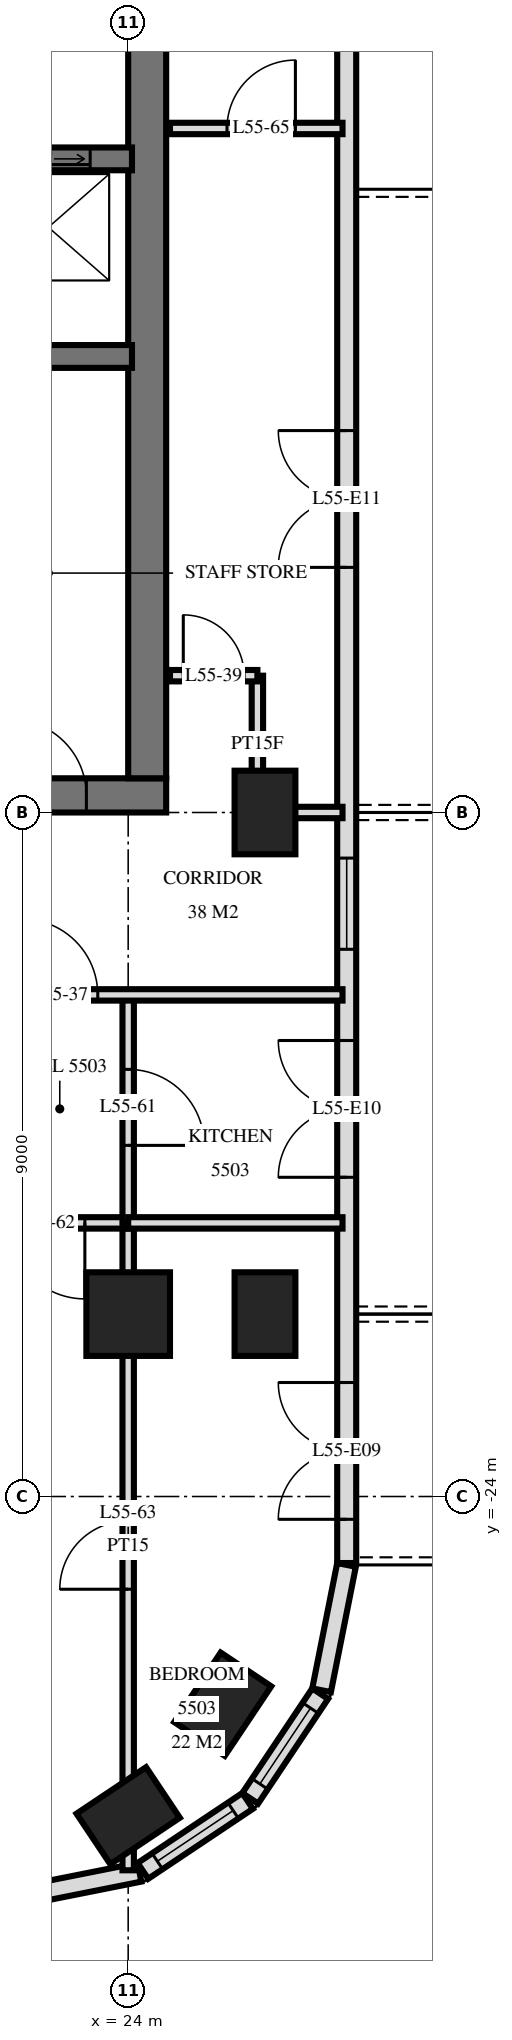
"""IFC4 building model, lengths in metres.
Left out: names, types, materials, properties, quantities, classifications, styles, units other than length and angle.
Written with IfcOpenShell. Run it as: python <this file> out.ifc"""

import sys

from ifc_helpers import new_model, si_unit, direction, frame, frame_2d, origin, origin_2d, place, context, subcontext, project, spatial, rectangle, extrude, element, fill, save


model = new_model("IFC4")
c1 = context("Model", 3, precision=1e-05, world=origin(), true_north=direction((0.0, 1.0)))
c2 = subcontext(c1, "Body", "Model", "MODEL_VIEW")
j1 = project(units=[si_unit("LENGTHUNIT", "METRE"), si_unit("PLANEANGLEUNIT", "RADIAN")], contexts=[c1])
p1 = place(None, origin())
s1 = spatial("IfcSite", under=j1, at=p1, CompositionType="ELEMENT")
p2 = place(p1, origin())
s2 = spatial("IfcBuilding", under=s1, at=p2, CompositionType="ELEMENT")
p3 = place(p2, frame((0.0, 0.0, 211.6)))
s3 = spatial("IfcBuildingStorey", under=s2, at=p3, CompositionType="ELEMENT", Elevation=211.6)
p4 = place(p3, frame((24.0, -28.2, 0.0), z_axis=(0.0, 0.0, 1.0), x_axis=(0.831459915646, 0.555584744817, 0.0)))
e1 = element("IfcColumn", 1, at=p4, inside=s3, PredefinedType="COLUMN", context=c2, shape_type="SweptSolid", body=[
    extrude(rectangle(XDim=1.1, YDim=0.8, at=origin_2d()), origin(), (0.0, 0.0, 1.0), 3.5),
])
p5 = place(p3, frame((24.0, -21.6, 0.0), z_axis=(0.0, 0.0, 1.0), x_axis=(1.0, 0.0, 0.0)))
e2 = element("IfcColumn", 2, at=p5, inside=s3, PredefinedType="COLUMN", context=c2, shape_type="SweptSolid", body=[
    extrude(rectangle(XDim=1.1, YDim=1.1, at=origin_2d()), origin(), (0.0, 0.0, 1.0), 3.5),
])
for number, where, z_axis, x_axis in (
    (3, (25.244, -26.733, 0.0), (0.0, 0.0, 1.0), (0.556, 0.831, 0.0)),
    (4, (25.8, -21.6, 0.0), (0.0, 0.0, 1.0), (0.0, 1.0, 0.0)),
    (5, (25.8, -15.0, 0.0), (0.0, 0.0, 1.0), (0.0, 1.0, 0.0)),
):
    element("IfcColumn", number, at=place(p3, frame(where, z_axis=z_axis, x_axis=x_axis)), inside=s3, PredefinedType="COLUMN", context=c2, shape_type="SweptSolid", body=[
        extrude(rectangle(XDim=1.1, YDim=0.8, at=origin_2d()), origin(), (0.0, 0.0, 1.0), 3.5),
    ])
p6 = place(p3, frame((10.0, -14.775, 0.0), z_axis=(0.0, 0.0, 1.0), x_axis=(1.0, 0.0, 0.0)))
e6 = element("IfcWall", 6, at=p6, inside=s3, PredefinedType="SHEAR", context=c2, shape_type="SweptSolid", body=[
    extrude(rectangle(XDim=14.5, YDim=0.45, at=frame_2d((7.25, 0.0))), origin(), (0.0, 0.0, 1.0), 3.5),
])
p7 = place(p6, frame((7.1, 0.0, 0.0)))
e7 = element("IfcOpeningElement", 7, at=p7, cuts=e6, PredefinedType="OPENING", context=c2, shape_type="SweptSolid", body=[
    extrude(rectangle(XDim=1.2, YDim=2.1, at=frame_2d((0.6, 1.05))), frame((0.0, 0.235, 0.0), z_axis=(0.0, -1.0, 0.0), x_axis=(1.0, 0.0, 0.0)), (0.0, 0.0, 1.0), 0.47),
])
p8 = place(p6, frame((4.15, 0.0, 0.0)))
e8 = element("IfcOpeningElement", 8, at=p8, cuts=e6, PredefinedType="OPENING", context=c2, shape_type="SweptSolid", body=[
    extrude(rectangle(XDim=1.1, YDim=2.1, at=frame_2d((0.55, 1.05))), frame((0.0, 0.235, 0.0), z_axis=(0.0, -1.0, 0.0), x_axis=(1.0, 0.0, 0.0)), (0.0, 0.0, 1.0), 0.47),
])
p9 = place(p6, frame((10.1, 0.0, 0.0)))
e9 = element("IfcOpeningElement", 9, at=p9, cuts=e6, PredefinedType="OPENING", context=c2, shape_type="SweptSolid", body=[
    extrude(rectangle(XDim=0.9, YDim=2.1, at=frame_2d((0.45, 1.05))), frame((0.0, 0.235, 0.0), z_axis=(0.0, -1.0, 0.0), x_axis=(1.0, 0.0, 0.0)), (0.0, 0.0, 1.0), 0.47),
])
p10 = place(p6, frame((12.45, 0.0, 0.0)))
e10 = element("IfcOpeningElement", 10, at=p10, cuts=e6, PredefinedType="OPENING", context=c2, shape_type="SweptSolid", body=[
    extrude(rectangle(XDim=1.0, YDim=2.1, at=frame_2d((0.5, 1.05))), frame((0.0, 0.235, 0.0), z_axis=(0.0, -1.0, 0.0), x_axis=(1.0, 0.0, 0.0)), (0.0, 0.0, 1.0), 0.47),
])
p11 = place(p3, frame((24.25, -14.55, 0.0), z_axis=(0.0, 0.0, 1.0), x_axis=(0.0, 1.0, 0.0)))
e11 = element("IfcWall", 11, at=p11, inside=s3, PredefinedType="SHEAR", context=c2, shape_type="SweptSolid", body=[
    extrude(rectangle(XDim=14.1, YDim=0.5, at=frame_2d((7.05, 0.0))), origin(), (0.0, 0.0, 1.0), 3.5),
])
p12 = place(p3, frame((10.35, -6.4, 0.0), z_axis=(0.0, 0.0, 1.0), x_axis=(1.0, 0.0, 0.0)))
e12 = element("IfcWall", 12, at=p12, inside=s3, PredefinedType="SHEAR", context=c2, shape_type="SweptSolid", body=[
    extrude(rectangle(XDim=13.7, YDim=0.3, at=frame_2d((6.85, 0.0))), origin(), (0.0, 0.0, 1.0), 3.5),
])
p13 = place(p12, frame((12.05, 0.0, 0.0)))
e13 = element("IfcOpeningElement", 13, at=p13, cuts=e12, PredefinedType="OPENING", context=c2, shape_type="SweptSolid", body=[
    extrude(rectangle(XDim=1.1, YDim=2.1, at=frame_2d((0.55, 1.05))), frame((0.0, 0.16, 0.0), z_axis=(0.0, -1.0, 0.0), x_axis=(1.0, 0.0, 0.0)), (0.0, 0.0, 1.0), 0.32),
])
p14 = place(p12, frame((6.8, 0.0, 0.0)))
e14 = element("IfcOpeningElement", 14, at=p14, cuts=e12, PredefinedType="OPENING", context=c2, shape_type="SweptSolid", body=[
    extrude(rectangle(XDim=1.1, YDim=2.1, at=frame_2d((0.55, 1.05))), frame((0.0, 0.16, 0.0), z_axis=(0.0, -1.0, 0.0), x_axis=(1.0, 0.0, 0.0)), (0.0, 0.0, 1.0), 0.32),
])
p15 = place(p3, frame((10.35, -9.0, 0.0), z_axis=(0.0, 0.0, 1.0), x_axis=(1.0, 0.0, 0.0)))
e15 = element("IfcWall", 15, at=p15, inside=s3, PredefinedType="SHEAR", context=c2, shape_type="SweptSolid", body=[
    extrude(rectangle(XDim=13.7, YDim=0.3, at=frame_2d((6.85, 0.0))), origin(), (0.0, 0.0, 1.0), 3.5),
])
p16 = place(p15, frame((3.8, 0.0, 0.0)))
e16 = element("IfcOpeningElement", 16, at=p16, cuts=e15, PredefinedType="OPENING", context=c2, shape_type="SweptSolid", body=[
    extrude(rectangle(XDim=1.1, YDim=2.1, at=frame_2d((0.55, 1.05))), frame((0.0, 0.16, 0.0), z_axis=(0.0, -1.0, 0.0), x_axis=(1.0, 0.0, 0.0)), (0.0, 0.0, 1.0), 0.32),
])
p17 = place(p3, frame((22.5, -29.273, 0.0), z_axis=(0.0, 0.0, 1.0), x_axis=(0.980775640221, 0.19513878023, 0.0)))
e17 = element("IfcWall", 17, at=p17, inside=s3, PredefinedType="SOLIDWALL", context=c2, shape_type="SweptSolid", body=[
    extrude(rectangle(XDim=1.681, YDim=0.25, at=frame_2d((0.841, 0.0))), origin(), (0.0, 0.0, 1.0), 3.22),
])
p18 = place(p3, frame((24.194, -28.926, 0.0), z_axis=(0.0, 0.0, 1.0), x_axis=(0.831482937015, 0.55555029066, 0.0)))
e18 = element("IfcWall", 18, at=p18, inside=s3, PredefinedType="SOLIDWALL", context=c2, shape_type="SweptSolid", body=[
    extrude(rectangle(XDim=1.656, YDim=0.25, at=frame_2d((0.828, 0.0))), origin(), (0.0, 0.0, 1.0), 3.22),
])
p19 = place(p18, frame((0.228, 0.0, 0.9)))
e19 = element("IfcOpeningElement", 19, at=p19, cuts=e18, PredefinedType="OPENING", context=c2, shape_type="SweptSolid", body=[
    extrude(rectangle(XDim=1.2, YDim=1.5, at=frame_2d((0.6, 0.75))), frame((0.0, 0.135, 0.0), z_axis=(0.0, -1.0, 0.0), x_axis=(1.0, 0.0, 0.0)), (0.0, 0.0, 1.0), 0.27),
])
p20 = place(p3, frame((25.606, -27.971, 0.0), z_axis=(0.0, 0.0, 1.0), x_axis=(0.55555029066, 0.831482937015, 0.0)))
e20 = element("IfcWall", 20, at=p20, inside=s3, PredefinedType="SOLIDWALL", context=c2, shape_type="SweptSolid", body=[
    extrude(rectangle(XDim=1.656, YDim=0.25, at=frame_2d((0.828, 0.0))), origin(), (0.0, 0.0, 1.0), 3.22),
])
p21 = place(p20, frame((0.228, 0.0, 0.9)))
e21 = element("IfcOpeningElement", 21, at=p21, cuts=e20, PredefinedType="OPENING", context=c2, shape_type="SweptSolid", body=[
    extrude(rectangle(XDim=1.2, YDim=1.5, at=frame_2d((0.6, 0.75))), frame((0.0, 0.135, 0.0), z_axis=(0.0, -1.0, 0.0), x_axis=(1.0, 0.0, 0.0)), (0.0, 0.0, 1.0), 0.27),
])
p22 = place(p3, frame((26.545, -26.549, 0.0), z_axis=(0.0, 0.0, 1.0), x_axis=(0.195026884138, 0.980797896849, 0.0)))
e22 = element("IfcWall", 22, at=p22, inside=s3, PredefinedType="SOLIDWALL", context=c2, shape_type="SweptSolid", body=[
    extrude(rectangle(XDim=1.681, YDim=0.25, at=frame_2d((0.841, 0.0))), origin(), (0.0, 0.0, 1.0), 3.22),
])
p23 = place(p3, frame((26.875, -24.875, 0.0), z_axis=(0.0, 0.0, 1.0), x_axis=(0.0, 1.0, 0.0)))
e23 = element("IfcWall", 23, at=p23, inside=s3, PredefinedType="SOLIDWALL", context=c2, shape_type="SweptSolid", body=[
    extrude(rectangle(XDim=21.551, YDim=0.25, at=frame_2d((10.775, 0.0))), origin(), (0.0, 0.0, 1.0), 3.22),
])
p24 = place(p23, frame((0.575, 0.0, 0.0)))
e24 = element("IfcOpeningElement", 24, at=p24, cuts=e23, PredefinedType="OPENING", context=c2, shape_type="SweptSolid", body=[
    extrude(rectangle(XDim=1.8, YDim=2.4, at=frame_2d((0.9, 1.2))), frame((0.0, 0.135, 0.0), z_axis=(0.0, -1.0, 0.0), x_axis=(1.0, 0.0, 0.0)), (0.0, 0.0, 1.0), 0.27),
])
p25 = place(p23, frame((5.075, 0.0, 0.0)))
e25 = element("IfcOpeningElement", 25, at=p25, cuts=e23, PredefinedType="OPENING", context=c2, shape_type="SweptSolid", body=[
    extrude(rectangle(XDim=1.8, YDim=2.4, at=frame_2d((0.9, 1.2))), frame((0.0, 0.135, 0.0), z_axis=(0.0, -1.0, 0.0), x_axis=(1.0, 0.0, 0.0)), (0.0, 0.0, 1.0), 0.27),
])
p26 = place(p23, frame((8.075, 0.0, 0.9)))
e26 = element("IfcOpeningElement", 26, at=p26, cuts=e23, PredefinedType="OPENING", context=c2, shape_type="SweptSolid", body=[
    extrude(rectangle(XDim=1.2, YDim=1.5, at=frame_2d((0.6, 0.75))), frame((0.0, 0.135, 0.0), z_axis=(0.0, -1.0, 0.0), x_axis=(1.0, 0.0, 0.0)), (0.0, 0.0, 1.0), 0.27),
])
p27 = place(p23, frame((13.1, 0.0, 0.0)))
e27 = element("IfcOpeningElement", 27, at=p27, cuts=e23, PredefinedType="OPENING", context=c2, shape_type="SweptSolid", body=[
    extrude(rectangle(XDim=1.8, YDim=2.4, at=frame_2d((0.9, 1.2))), frame((0.0, 0.135, 0.0), z_axis=(0.0, -1.0, 0.0), x_axis=(1.0, 0.0, 0.0)), (0.0, 0.0, 1.0), 0.27),
])
p28 = place(p3, frame((25.7, -15.0, 0.0), z_axis=(0.0, 0.0, 1.0), x_axis=(0.0, 1.0, 0.0)))
e28 = element("IfcWall", 28, at=p28, inside=s3, PredefinedType="PARTITIONING", context=c2, shape_type="SweptSolid", body=[
    extrude(rectangle(XDim=1.8, YDim=0.15, at=frame_2d((0.9, 0.0))), origin(), (0.0, 0.0, 1.0), 3.22),
])
p29 = place(p3, frame((24.0, -20.4, 0.0), z_axis=(0.0, 0.0, 1.0), x_axis=(0.0, 1.0, 0.0)))
e29 = element("IfcWall", 29, at=p29, inside=s3, PredefinedType="PARTITIONING", context=c2, shape_type="SweptSolid", body=[
    extrude(rectangle(XDim=3.0, YDim=0.15, at=frame_2d((1.5, 0.0))), origin(), (0.0, 0.0, 1.0), 3.22),
])
p30 = place(p29, frame((1.02, 0.0, 0.0)))
e30 = element("IfcOpeningElement", 30, at=p30, cuts=e29, PredefinedType="OPENING", context=c2, shape_type="SweptSolid", body=[
    extrude(rectangle(XDim=1.0, YDim=2.1, at=frame_2d((0.5, 1.05))), frame((0.0, 0.085, 0.0), z_axis=(0.0, -1.0, 0.0), x_axis=(1.0, 0.0, 0.0)), (0.0, 0.0, 1.0), 0.17),
])
p31 = place(p3, frame((24.0, -28.918, 0.0), z_axis=(0.0, 0.0, 1.0), x_axis=(0.0, 1.0, 0.0)))
e31 = element("IfcWall", 31, at=p31, inside=s3, PredefinedType="PARTITIONING", context=c2, shape_type="SweptSolid", body=[
    extrude(rectangle(XDim=8.518, YDim=0.15, at=frame_2d((4.259, 0.0))), origin(), (0.0, 0.0, 1.0), 3.22),
])
p32 = place(p31, frame((3.698, 0.0, 0.0)))
e32 = element("IfcOpeningElement", 32, at=p32, cuts=e31, PredefinedType="OPENING", context=c2, shape_type="SweptSolid", body=[
    extrude(rectangle(XDim=0.9, YDim=2.1, at=frame_2d((0.45, 1.05))), frame((0.0, 0.085, 0.0), z_axis=(0.0, -1.0, 0.0), x_axis=(1.0, 0.0, 0.0)), (0.0, 0.0, 1.0), 0.17),
])
p33 = place(p3, frame((22.2, -20.4, 0.0), z_axis=(0.0, 0.0, 1.0), x_axis=(1.0, 0.0, 0.0)))
e33 = element("IfcWall", 33, at=p33, inside=s3, PredefinedType="PARTITIONING", context=c2, shape_type="SweptSolid", body=[
    extrude(rectangle(XDim=1.8, YDim=0.15, at=frame_2d((0.9, 0.0))), origin(), (0.0, 0.0, 1.0), 3.22),
])
p34 = place(p33, frame((0.23, 0.0, 0.0)))
e34 = element("IfcOpeningElement", 34, at=p34, cuts=e33, PredefinedType="OPENING", context=c2, shape_type="SweptSolid", body=[
    extrude(rectangle(XDim=1.0, YDim=2.1, at=frame_2d((0.5, 1.05))), frame((0.0, 0.085, 0.0), z_axis=(0.0, -1.0, 0.0), x_axis=(1.0, 0.0, 0.0)), (0.0, 0.0, 1.0), 0.17),
])
p35 = place(p3, frame((24.0, -20.4, 0.0), z_axis=(0.0, 0.0, 1.0), x_axis=(1.0, 0.0, 0.0)))
e35 = element("IfcWall", 35, at=p35, inside=s3, PredefinedType="PARTITIONING", context=c2, shape_type="SweptSolid", body=[
    extrude(rectangle(XDim=2.82, YDim=0.15, at=frame_2d((1.41, 0.0))), origin(), (0.0, 0.0, 1.0), 3.22),
])
p36 = place(p3, frame((-26.82, -17.4, 0.0), z_axis=(0.0, 0.0, 1.0), x_axis=(1.0, 0.0, 0.0)))
e36 = element("IfcWall", 36, at=p36, inside=s3, PredefinedType="PARTITIONING", context=c2, shape_type="SweptSolid", body=[
    extrude(rectangle(XDim=53.64, YDim=0.15, at=frame_2d((26.82, 0.0))), origin(), (0.0, 0.0, 1.0), 3.22),
])
p37 = place(p36, frame((4.92, 0.0, 0.0)))
e37 = element("IfcOpeningElement", 37, at=p37, cuts=e36, PredefinedType="OPENING", context=c2, shape_type="SweptSolid", body=[
    extrude(rectangle(XDim=1.0, YDim=2.1, at=frame_2d((0.5, 1.05))), frame((0.0, 0.085, 0.0), z_axis=(0.0, -1.0, 0.0), x_axis=(1.0, 0.0, 0.0)), (0.0, 0.0, 1.0), 0.17),
])
p38 = place(p36, frame((1.62, 0.0, 0.0)))
e38 = element("IfcOpeningElement", 38, at=p38, cuts=e36, PredefinedType="OPENING", context=c2, shape_type="SweptSolid", body=[
    extrude(rectangle(XDim=1.0, YDim=2.1, at=frame_2d((0.5, 1.05))), frame((0.0, 0.085, 0.0), z_axis=(0.0, -1.0, 0.0), x_axis=(1.0, 0.0, 0.0)), (0.0, 0.0, 1.0), 0.17),
])
p39 = place(p36, frame((41.17, 0.0, 0.0)))
e39 = element("IfcOpeningElement", 39, at=p39, cuts=e36, PredefinedType="OPENING", context=c2, shape_type="SweptSolid", body=[
    extrude(rectangle(XDim=1.0, YDim=2.1, at=frame_2d((0.5, 1.05))), frame((0.0, 0.085, 0.0), z_axis=(0.0, -1.0, 0.0), x_axis=(1.0, 0.0, 0.0)), (0.0, 0.0, 1.0), 0.17),
])
p40 = place(p36, frame((49.42, 0.0, 0.0)))
e40 = element("IfcOpeningElement", 40, at=p40, cuts=e36, PredefinedType="OPENING", context=c2, shape_type="SweptSolid", body=[
    extrude(rectangle(XDim=1.0, YDim=2.1, at=frame_2d((0.5, 1.05))), frame((0.0, 0.085, 0.0), z_axis=(0.0, -1.0, 0.0), x_axis=(1.0, 0.0, 0.0)), (0.0, 0.0, 1.0), 0.17),
])
p41 = place(p36, frame((47.62, 0.0, 0.0)))
e41 = element("IfcOpeningElement", 41, at=p41, cuts=e36, PredefinedType="OPENING", context=c2, shape_type="SweptSolid", body=[
    extrude(rectangle(XDim=1.0, YDim=2.1, at=frame_2d((0.5, 1.05))), frame((0.0, 0.085, 0.0), z_axis=(0.0, -1.0, 0.0), x_axis=(1.0, 0.0, 0.0)), (0.0, 0.0, 1.0), 0.17),
])
p42 = place(p36, frame((21.82, 0.0, 0.0)))
e42 = element("IfcOpeningElement", 42, at=p42, cuts=e36, PredefinedType="OPENING", context=c2, shape_type="SweptSolid", body=[
    extrude(rectangle(XDim=1.0, YDim=2.1, at=frame_2d((0.5, 1.05))), frame((0.0, 0.085, 0.0), z_axis=(0.0, -1.0, 0.0), x_axis=(1.0, 0.0, 0.0)), (0.0, 0.0, 1.0), 0.17),
])
p43 = place(p36, frame((33.82, 0.0, 0.0)))
e43 = element("IfcOpeningElement", 43, at=p43, cuts=e36, PredefinedType="OPENING", context=c2, shape_type="SweptSolid", body=[
    extrude(rectangle(XDim=1.0, YDim=2.1, at=frame_2d((0.5, 1.05))), frame((0.0, 0.085, 0.0), z_axis=(0.0, -1.0, 0.0), x_axis=(1.0, 0.0, 0.0)), (0.0, 0.0, 1.0), 0.17),
])
p44 = place(p3, frame((25.7, -15.0, 0.0), z_axis=(0.0, 0.0, 1.0), x_axis=(1.0, 0.0, 0.0)))
e44 = element("IfcWall", 44, at=p44, inside=s3, PredefinedType="PARTITIONING", context=c2, shape_type="SweptSolid", body=[
    extrude(rectangle(XDim=1.12, YDim=0.15, at=frame_2d((0.56, 0.0))), origin(), (0.0, 0.0, 1.0), 3.22),
])
p45 = place(p3, frame((24.55, -13.2, 0.0), z_axis=(0.0, 0.0, 1.0), x_axis=(1.0, 0.0, 0.0)))
e45 = element("IfcWall", 45, at=p45, inside=s3, PredefinedType="PARTITIONING", context=c2, shape_type="SweptSolid", body=[
    extrude(rectangle(XDim=1.15, YDim=0.15, at=frame_2d((0.575, 0.0))), origin(), (0.0, 0.0, 1.0), 3.22),
])
p46 = place(p45, frame((0.175, 0.0, 0.0)))
e46 = element("IfcOpeningElement", 46, at=p46, cuts=e45, PredefinedType="OPENING", context=c2, shape_type="SweptSolid", body=[
    extrude(rectangle(XDim=0.8, YDim=2.1, at=frame_2d((0.4, 1.05))), frame((0.0, 0.085, 0.0), z_axis=(0.0, -1.0, 0.0), x_axis=(1.0, 0.0, 0.0)), (0.0, 0.0, 1.0), 0.17),
])
p47 = place(p3, frame((24.55, -6.0, 0.0), z_axis=(0.0, 0.0, 1.0), x_axis=(1.0, 0.0, 0.0)))
e47 = element("IfcWall", 47, at=p47, inside=s3, PredefinedType="PARTITIONING", context=c2, shape_type="SweptSolid", body=[
    extrude(rectangle(XDim=2.27, YDim=0.15, at=frame_2d((1.135, 0.0))), origin(), (0.0, 0.0, 1.0), 3.22),
])
p48 = place(p47, frame((0.75, 0.0, 0.0)))
e48 = element("IfcOpeningElement", 48, at=p48, cuts=e47, PredefinedType="OPENING", context=c2, shape_type="SweptSolid", body=[
    extrude(rectangle(XDim=0.9, YDim=2.1, at=frame_2d((0.45, 1.05))), frame((0.0, 0.085, 0.0), z_axis=(0.0, -1.0, 0.0), x_axis=(1.0, 0.0, 0.0)), (0.0, 0.0, 1.0), 0.17),
])
p49 = place(p19, origin())
e49 = element("IfcWindow", 49, at=p49, inside=s3, PartitioningType="SINGLE_PANEL", PredefinedType="WINDOW", context=c2, shape_type="SweptSolid", body=[
    extrude(rectangle(XDim=1.2, YDim=1.5, at=frame_2d((0.6, 0.75))), frame((0.0, 0.03, 0.0), z_axis=(0.0, -1.0, 0.0), x_axis=(1.0, 0.0, 0.0)), (0.0, 0.0, 1.0), 0.06),
])
fill(e19, e49)
p50 = place(p21, origin())
e50 = element("IfcWindow", 50, at=p50, inside=s3, PartitioningType="SINGLE_PANEL", PredefinedType="WINDOW", context=c2, shape_type="SweptSolid", body=[
    extrude(rectangle(XDim=1.2, YDim=1.5, at=frame_2d((0.6, 0.75))), frame((0.0, 0.03, 0.0), z_axis=(0.0, -1.0, 0.0), x_axis=(1.0, 0.0, 0.0)), (0.0, 0.0, 1.0), 0.06),
])
fill(e21, e50)
p51 = place(p24, origin())
e51 = element("IfcDoor", 51, at=p51, inside=s3, OperationType="DOUBLE_DOOR_SINGLE_SWING", PredefinedType="DOOR", context=c2, shape_type="SweptSolid", body=[
    extrude(rectangle(XDim=1.8, YDim=2.4, at=frame_2d((0.9, 1.2))), frame((0.0, 0.025, 0.0), z_axis=(0.0, -1.0, 0.0), x_axis=(1.0, 0.0, 0.0)), (0.0, 0.0, 1.0), 0.05),
])
fill(e24, e51)
p52 = place(p25, origin())
e52 = element("IfcDoor", 52, at=p52, inside=s3, OperationType="DOUBLE_DOOR_SINGLE_SWING", PredefinedType="DOOR", context=c2, shape_type="SweptSolid", body=[
    extrude(rectangle(XDim=1.8, YDim=2.4, at=frame_2d((0.9, 1.2))), frame((0.0, 0.025, 0.0), z_axis=(0.0, -1.0, 0.0), x_axis=(1.0, 0.0, 0.0)), (0.0, 0.0, 1.0), 0.05),
])
fill(e25, e52)
p53 = place(p26, origin())
e53 = element("IfcWindow", 53, at=p53, inside=s3, PartitioningType="SINGLE_PANEL", PredefinedType="WINDOW", context=c2, shape_type="SweptSolid", body=[
    extrude(rectangle(XDim=1.2, YDim=1.5, at=frame_2d((0.6, 0.75))), frame((0.0, 0.03, 0.0), z_axis=(0.0, -1.0, 0.0), x_axis=(1.0, 0.0, 0.0)), (0.0, 0.0, 1.0), 0.06),
])
fill(e26, e53)
p54 = place(p27, origin())
e54 = element("IfcDoor", 54, at=p54, inside=s3, OperationType="DOUBLE_DOOR_SINGLE_SWING", PredefinedType="DOOR", context=c2, shape_type="SweptSolid", body=[
    extrude(rectangle(XDim=1.8, YDim=2.4, at=frame_2d((0.9, 1.2))), frame((0.0, 0.025, 0.0), z_axis=(0.0, -1.0, 0.0), x_axis=(1.0, 0.0, 0.0)), (0.0, 0.0, 1.0), 0.05),
])
fill(e27, e54)
p55 = place(p13, origin())
e55 = element("IfcDoor", 55, at=p55, inside=s3, OperationType="DOUBLE_DOOR_SLIDING", PredefinedType="USERDEFINED", context=c2, shape_type="SweptSolid", body=[
    extrude(rectangle(XDim=1.1, YDim=2.1, at=frame_2d((0.55, 1.05))), frame((0.0, 0.025, 0.0), z_axis=(0.0, -1.0, 0.0), x_axis=(1.0, 0.0, 0.0)), (0.0, 0.0, 1.0), 0.05),
])
fill(e13, e55)
p56 = place(p10, origin())
e56 = element("IfcDoor", 56, at=p56, inside=s3, OperationType="SINGLE_SWING_RIGHT", PredefinedType="DOOR", context=c2, shape_type="SweptSolid", body=[
    extrude(rectangle(XDim=1.0, YDim=2.1, at=frame_2d((0.5, 1.05))), frame((0.0, 0.025, 0.0), z_axis=(0.0, -1.0, 0.0), x_axis=(1.0, 0.0, 0.0)), (0.0, 0.0, 1.0), 0.05),
])
fill(e10, e56)
p57 = place(p40, origin())
e57 = element("IfcDoor", 57, at=p57, inside=s3, OperationType="SINGLE_SWING_RIGHT", PredefinedType="DOOR", context=c2, shape_type="SweptSolid", body=[
    extrude(rectangle(XDim=1.0, YDim=2.1, at=frame_2d((0.5, 1.05))), frame((0.0, 0.025, 0.0), z_axis=(0.0, -1.0, 0.0), x_axis=(1.0, 0.0, 0.0)), (0.0, 0.0, 1.0), 0.05),
])
fill(e40, e57)
p58 = place(p46, origin())
e58 = element("IfcDoor", 58, at=p58, inside=s3, OperationType="SINGLE_SWING_RIGHT", PredefinedType="DOOR", context=c2, shape_type="SweptSolid", body=[
    extrude(rectangle(XDim=0.8, YDim=2.1, at=frame_2d((0.4, 1.05))), frame((0.0, 0.025, 0.0), z_axis=(0.0, -1.0, 0.0), x_axis=(1.0, 0.0, 0.0)), (0.0, 0.0, 1.0), 0.05),
])
fill(e46, e58)
p59 = place(p30, frame((0.5, 0.0, 0.0), z_axis=(0.0, 0.0, 1.0), x_axis=(-1.0, 0.0, 0.0)))
e59 = element("IfcDoor", 59, at=p59, inside=s3, OperationType="SINGLE_SWING_LEFT", PredefinedType="DOOR", context=c2, shape_type="SweptSolid", body=[
    extrude(rectangle(XDim=1.0, YDim=2.1, at=frame_2d((0.0, 1.05))), frame((0.0, -0.025, 0.0), z_axis=(0.0, 1.0, 0.0), x_axis=(-1.0, 0.0, 0.0)), (0.0, 0.0, 1.0), 0.05),
])
fill(e30, e59)
p60 = place(p34, frame((0.5, 0.0, 0.0), z_axis=(0.0, 0.0, 1.0), x_axis=(-1.0, 0.0, 0.0)))
e60 = element("IfcDoor", 60, at=p60, inside=s3, OperationType="SINGLE_SWING_RIGHT", PredefinedType="DOOR", context=c2, shape_type="SweptSolid", body=[
    extrude(rectangle(XDim=1.0, YDim=2.1, at=frame_2d((0.0, 1.05))), frame((0.0, -0.025, 0.0), z_axis=(0.0, 1.0, 0.0), x_axis=(-1.0, 0.0, 0.0)), (0.0, 0.0, 1.0), 0.05),
])
fill(e34, e60)
p61 = place(p32, origin())
e61 = element("IfcDoor", 61, at=p61, inside=s3, OperationType="SINGLE_SWING_RIGHT", PredefinedType="DOOR", context=c2, shape_type="SweptSolid", body=[
    extrude(rectangle(XDim=0.9, YDim=2.1, at=frame_2d((0.45, 1.05))), frame((0.0, 0.025, 0.0), z_axis=(0.0, -1.0, 0.0), x_axis=(1.0, 0.0, 0.0)), (0.0, 0.0, 1.0), 0.05),
])
fill(e32, e61)
p62 = place(p48, origin())
e62 = element("IfcDoor", 62, at=p62, inside=s3, OperationType="SINGLE_SWING_LEFT", PredefinedType="DOOR", context=c2, shape_type="SweptSolid", body=[
    extrude(rectangle(XDim=0.9, YDim=2.1, at=frame_2d((0.45, 1.05))), frame((0.0, 0.025, 0.0), z_axis=(0.0, -1.0, 0.0), x_axis=(1.0, 0.0, 0.0)), (0.0, 0.0, 1.0), 0.05),
])
fill(e48, e62)
save(model, sys.argv[1])
